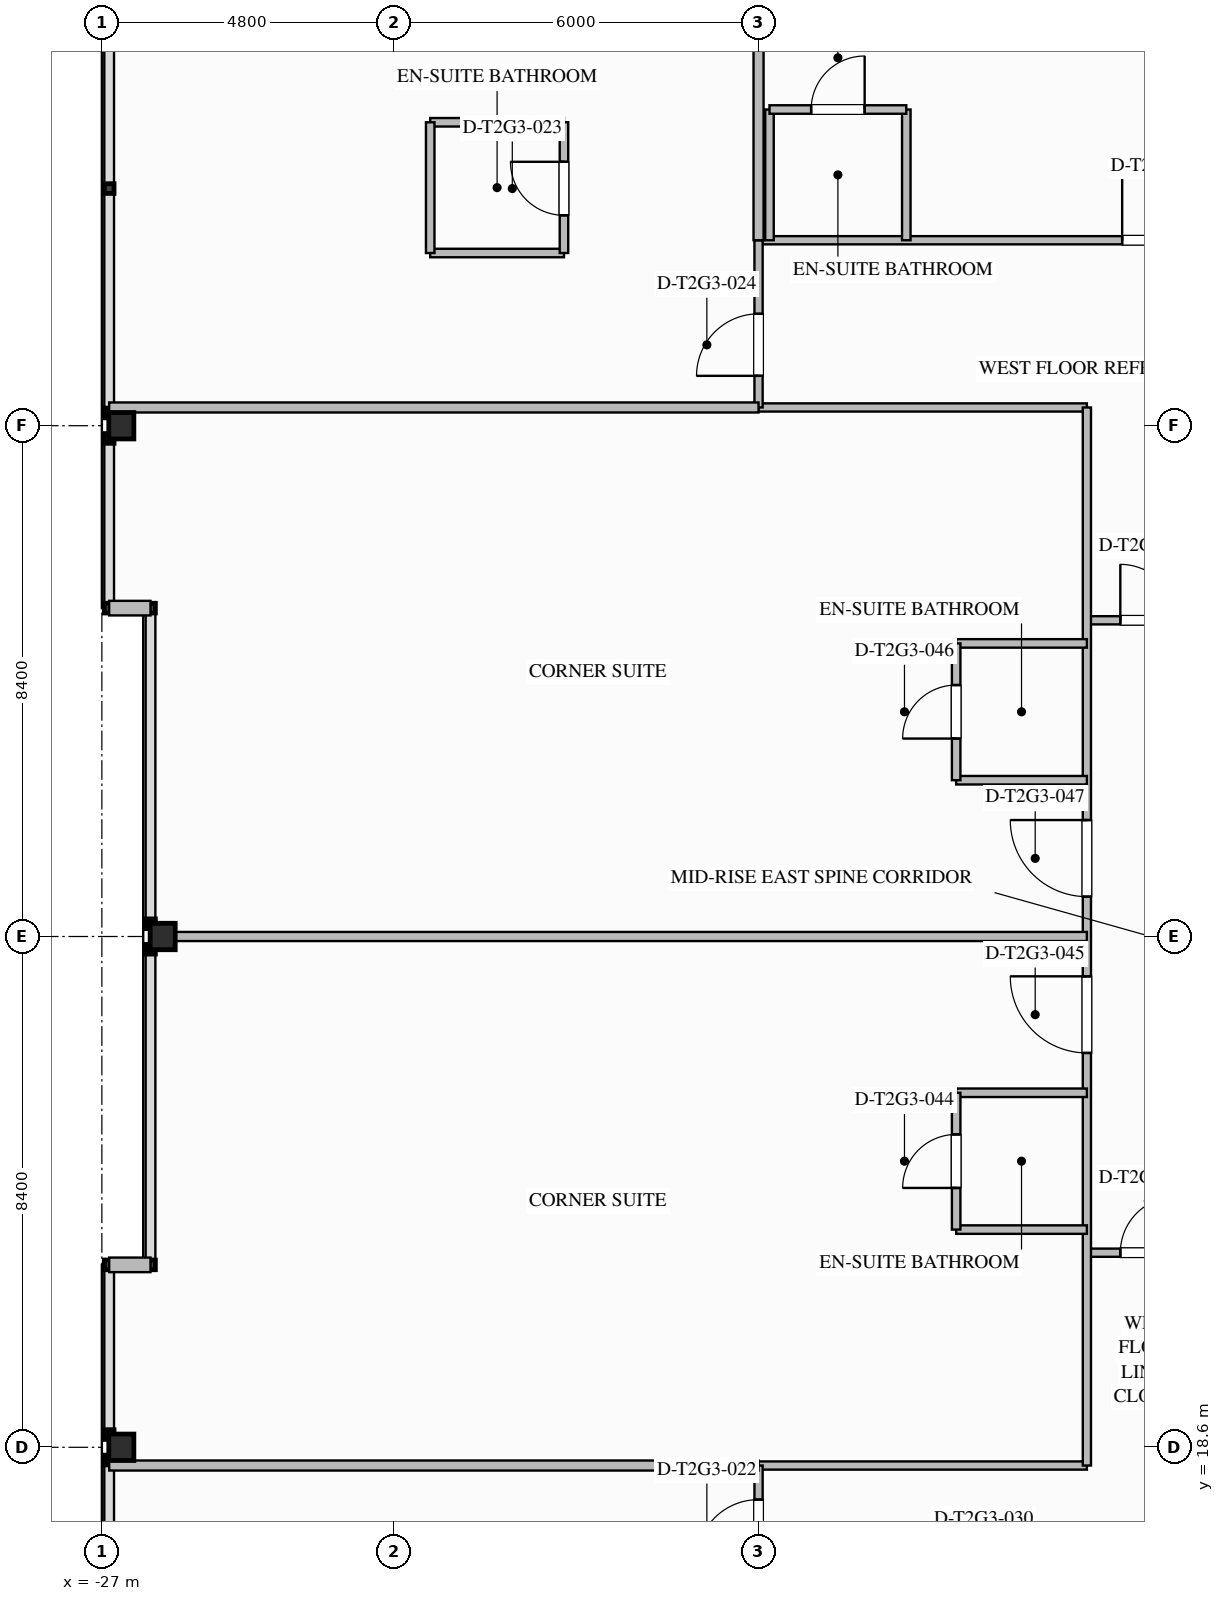
"""IFC4 building model, lengths in metres.
Left out: names, types, materials, properties, quantities, classifications, styles, units other than length and angle.
Written with IfcOpenShell. Run it as: python <this file> out.ifc"""

import sys

from ifc_helpers import new_model, si_unit, direction, frame, frame_2d, origin, origin_2d, place, context, subcontext, project, spatial, rectangle, i_section, extrude, element, fill, save


model = new_model("IFC4")
c1 = context("Model", 3, precision=1e-05, world=origin(), true_north=direction((0.0, 1.0)))
c2 = subcontext(c1, "Body", "Model", "MODEL_VIEW")
j1 = project(units=[si_unit("LENGTHUNIT", "METRE"), si_unit("PLANEANGLEUNIT", "RADIAN")], contexts=[c1])
p1 = place(None, origin())
s1 = spatial("IfcSite", under=j1, at=p1, CompositionType="ELEMENT")
p2 = place(p1, origin())
s2 = spatial("IfcBuilding", under=s1, at=p2, CompositionType="ELEMENT")
p3 = place(p2, frame((0.0, 0.0, 119.8)))
s3 = spatial("IfcBuildingStorey", under=s2, at=p3, CompositionType="ELEMENT", Elevation=119.8)
for number, where, z_axis, x_axis in (
    (1, (-26.68, 18.6, 0.0), (0.0, 0.0, 1.0), (1.0, 0.0, 0.0)),
    (2, (-26.0, 27.0, 0.0), (0.0, 0.0, 1.0), (1.0, 0.0, 0.0)),
    (3, (-26.68, 35.4, 0.0), (0.0, 0.0, 1.0), (1.0, 0.0, 0.0)),
):
    element("IfcColumn", number, at=place(p3, frame(where, z_axis=z_axis, x_axis=x_axis)), inside=s3, PredefinedType="COLUMN", context=c2, shape_type="SweptSolid", body=[
        extrude(i_section(OverallWidth=0.412, OverallDepth=0.435, WebThickness=0.036, FlangeThickness=0.057, FilletRadius=0.028, at=origin_2d()), origin(), (0.0, 0.0, 1.0), 3.497),
    ])
for number, where, z_axis, x_axis in (
    (4, (-26.88, 21.6, 0.0), (0.0, 0.0, 1.0), (1.0, 0.0, 0.0)),
    (5, (-26.2, 32.4, 0.0), (0.0, 0.0, 1.0), (-1.0, 0.0, 0.0)),
):
    element("IfcWall", number, at=place(p3, frame(where, z_axis=z_axis, x_axis=x_axis)), inside=s3, PredefinedType="STANDARD", context=c2, shape_type="SweptSolid", body=[
        extrude(rectangle(XDim=0.68, YDim=0.24, at=frame_2d((0.34, 0.0))), origin(), (0.0, 0.0, 1.0), 3.24),
    ])
p4 = place(p3, frame((-10.8, 21.8, 0.0), z_axis=(0.0, 0.0, 1.0), x_axis=(1.0, 0.0, 0.0)))
e6 = element("IfcWall", 6, at=p4, inside=s3, PredefinedType="PARTITIONING", context=c2, shape_type="SweptSolid", body=[
    extrude(rectangle(XDim=2.1, YDim=0.135, at=frame_2d((1.05, 0.0))), origin(), (0.0, 0.0, 1.0), 3.24),
])
p5 = place(p4, frame((0.55, 0.0, 0.0)))
e7 = element("IfcOpeningElement", 7, at=p5, cuts=e6, PredefinedType="OPENING", context=c2, shape_type="SweptSolid", body=[
    extrude(rectangle(XDim=0.92, YDim=2.1, at=frame_2d((0.46, 1.05))), frame((0.0, 0.077, 0.0), z_axis=(0.0, -1.0, 0.0), x_axis=(1.0, 0.0, 0.0)), (0.0, 0.0, 1.0), 0.155),
])
p6 = place(p3, frame((-10.8, 32.2, 0.0), z_axis=(0.0, 0.0, 1.0), x_axis=(1.0, 0.0, 0.0)))
e8 = element("IfcWall", 8, at=p6, inside=s3, PredefinedType="PARTITIONING", context=c2, shape_type="SweptSolid", body=[
    extrude(rectangle(XDim=2.1, YDim=0.135, at=frame_2d((1.05, 0.0))), origin(), (0.0, 0.0, 1.0), 3.24),
])
p7 = place(p6, frame((0.55, 0.0, 0.0)))
e9 = element("IfcOpeningElement", 9, at=p7, cuts=e8, PredefinedType="OPENING", context=c2, shape_type="SweptSolid", body=[
    extrude(rectangle(XDim=0.92, YDim=2.1, at=frame_2d((0.46, 1.05))), frame((0.0, 0.077, 0.0), z_axis=(0.0, -1.0, 0.0), x_axis=(1.0, 0.0, 0.0)), (0.0, 0.0, 1.0), 0.155),
])
for number, where, z_axis, x_axis in (
    (10, (-16.2, 18.3, 0.0), (0.0, 0.0, 1.0), (1.0, 0.0, 0.0)),
    (11, (-16.2, 35.7, 0.0), (0.0, 0.0, 1.0), (1.0, 0.0, 0.0)),
):
    element("IfcWall", number, at=place(p3, frame(where, z_axis=z_axis, x_axis=x_axis)), inside=s3, PredefinedType="PARTITIONING", context=c2, shape_type="SweptSolid", body=[
        extrude(rectangle(XDim=5.4, YDim=0.135, at=frame_2d((2.7, 0.0))), origin(), (0.0, 0.0, 1.0), 3.24),
    ])
p8 = place(p3, frame((-16.2, 38.45, 0.0), z_axis=(0.0, 0.0, 1.0), x_axis=(1.0, 0.0, 0.0)))
e12 = element("IfcWall", 12, at=p8, inside=s3, PredefinedType="PARTITIONING", context=c2, shape_type="SweptSolid", body=[
    extrude(rectangle(XDim=24.9, YDim=0.135, at=frame_2d((12.45, 0.0))), origin(), (0.0, 0.0, 1.0), 3.24),
])
p9 = place(p8, frame((5.98, 0.0, 0.0)))
e13 = element("IfcOpeningElement", 13, at=p9, cuts=e12, PredefinedType="OPENING", context=c2, shape_type="SweptSolid", body=[
    extrude(rectangle(XDim=1.26, YDim=2.2, at=frame_2d((0.63, 1.1))), frame((0.0, 0.077, 0.0), z_axis=(0.0, -1.0, 0.0), x_axis=(1.0, 0.0, 0.0)), (0.0, 0.0, 1.0), 0.155),
])
p10 = place(p8, frame((16.0, 0.0, 0.0)))
e14 = element("IfcOpeningElement", 14, at=p10, cuts=e12, PredefinedType="OPENING", context=c2, shape_type="SweptSolid", body=[
    extrude(rectangle(XDim=1.26, YDim=2.2, at=frame_2d((0.63, 1.1))), frame((0.0, 0.077, 0.0), z_axis=(0.0, -1.0, 0.0), x_axis=(1.0, 0.0, 0.0)), (0.0, 0.0, 1.0), 0.155),
])
p11 = place(p3, frame((-10.8, 18.3, 0.0), z_axis=(0.0, 0.0, 1.0), x_axis=(0.0, 1.0, 0.0)))
e15 = element("IfcWall", 15, at=p11, inside=s3, PredefinedType="PARTITIONING", context=c2, shape_type="SweptSolid", body=[
    extrude(rectangle(XDim=17.4, YDim=0.135, at=frame_2d((8.7, 0.0))), origin(), (0.0, 0.0, 1.0), 3.24),
])
p12 = place(p11, frame((6.785, 0.0, 0.0)))
e16 = element("IfcOpeningElement", 16, at=p12, cuts=e15, PredefinedType="OPENING", context=c2, shape_type="SweptSolid", body=[
    extrude(rectangle(XDim=1.26, YDim=2.2, at=frame_2d((0.63, 1.1))), frame((0.0, 0.077, 0.0), z_axis=(0.0, -1.0, 0.0), x_axis=(1.0, 0.0, 0.0)), (0.0, 0.0, 1.0), 0.155),
])
p13 = place(p11, frame((9.355, 0.0, 0.0)))
e17 = element("IfcOpeningElement", 17, at=p13, cuts=e15, PredefinedType="OPENING", context=c2, shape_type="SweptSolid", body=[
    extrude(rectangle(XDim=1.26, YDim=2.2, at=frame_2d((0.63, 1.1))), frame((0.0, 0.077, 0.0), z_axis=(0.0, -1.0, 0.0), x_axis=(1.0, 0.0, 0.0)), (0.0, 0.0, 1.0), 0.155),
])
p14 = place(p3, frame((-16.2, 16.2, 0.0), z_axis=(0.0, 0.0, 1.0), x_axis=(0.0, 1.0, 0.0)))
e18 = element("IfcWall", 18, at=p14, inside=s3, PredefinedType="PARTITIONING", context=c2, shape_type="SweptSolid", body=[
    extrude(rectangle(XDim=2.1, YDim=0.135, at=frame_2d((1.05, 0.0))), origin(), (0.0, 0.0, 1.0), 2.53),
])
p15 = place(p14, frame((0.52, 0.0, 0.0)))
e19 = element("IfcOpeningElement", 19, at=p15, cuts=e18, PredefinedType="OPENING", context=c2, shape_type="SweptSolid", body=[
    extrude(rectangle(XDim=1.02, YDim=2.15, at=frame_2d((0.51, 1.075))), frame((0.0, 0.077, 0.0), z_axis=(0.0, -1.0, 0.0), x_axis=(1.0, 0.0, 0.0)), (0.0, 0.0, 1.0), 0.155),
])
p16 = place(p3, frame((-16.2, 35.7, 0.0), z_axis=(0.0, 0.0, 1.0), x_axis=(0.0, 1.0, 0.0)))
e20 = element("IfcWall", 20, at=p16, inside=s3, PredefinedType="PARTITIONING", context=c2, shape_type="SweptSolid", body=[
    extrude(rectangle(XDim=2.75, YDim=0.135, at=frame_2d((1.375, 0.0))), origin(), (0.0, 0.0, 1.0), 2.53),
])
p17 = place(p16, frame((0.52, 0.0, 0.0)))
e21 = element("IfcOpeningElement", 21, at=p17, cuts=e20, PredefinedType="OPENING", context=c2, shape_type="SweptSolid", body=[
    extrude(rectangle(XDim=1.02, YDim=2.15, at=frame_2d((0.51, 1.075))), frame((0.0, 0.077, 0.0), z_axis=(0.0, -1.0, 0.0), x_axis=(1.0, 0.0, 0.0)), (0.0, 0.0, 1.0), 0.155),
])
p18 = place(p3, frame((-16.2, 38.45, 0.0), z_axis=(0.0, 0.0, 1.0), x_axis=(0.0, 1.0, 0.0)))
e22 = element("IfcWall", 22, at=p18, inside=s3, PredefinedType="PARTITIONING", context=c2, shape_type="SweptSolid", body=[
    extrude(rectangle(XDim=15.43, YDim=0.165, at=frame_2d((7.715, 0.0))), origin(), (0.0, 0.0, 1.0), 2.53),
])
for number, where, z_axis, x_axis in (
    (23, (-26.88, 18.3, 0.0), (0.0, 0.0, 1.0), (1.0, 0.0, 0.0)),
    (24, (-26.88, 35.7, 0.0), (0.0, 0.0, 1.0), (1.0, 0.0, 0.0)),
):
    element("IfcWall", number, at=place(p3, frame(where, z_axis=z_axis, x_axis=x_axis)), inside=s3, PredefinedType="PARTITIONING", context=c2, shape_type="SweptSolid", body=[
        extrude(rectangle(XDim=10.68, YDim=0.165, at=frame_2d((5.34, 0.0))), origin(), (0.0, 0.0, 1.0), 2.53),
    ])
for number, where, z_axis, x_axis in (
    (25, (-21.6, 38.24, 0.0), (0.0, 0.0, 1.0), (1.0, 0.0, 0.0)),
    (26, (-21.6, 40.39, 0.0), (0.0, 0.0, 1.0), (1.0, 0.0, 0.0)),
):
    element("IfcWall", number, at=place(p3, frame(where, z_axis=z_axis, x_axis=x_axis)), inside=s3, PredefinedType="PLUMBINGWALL", context=c2, shape_type="SweptSolid", body=[
        extrude(rectangle(XDim=2.2, YDim=0.14, at=frame_2d((1.1, 0.0))), origin(), (0.0, 0.0, 1.0), 3.24),
    ])
p19 = place(p3, frame((-21.6, 38.24, 0.0), z_axis=(0.0, 0.0, 1.0), x_axis=(0.0, 1.0, 0.0)))
e27 = element("IfcWall", 27, at=p19, inside=s3, PredefinedType="PLUMBINGWALL", context=c2, shape_type="SweptSolid", body=[
    extrude(rectangle(XDim=2.15, YDim=0.14, at=frame_2d((1.075, 0.0))), origin(), (0.0, 0.0, 1.0), 3.24),
])
p20 = place(p3, frame((-19.4, 38.24, 0.0), z_axis=(0.0, 0.0, 1.0), x_axis=(0.0, 1.0, 0.0)))
e28 = element("IfcWall", 28, at=p20, inside=s3, PredefinedType="PLUMBINGWALL", context=c2, shape_type="SweptSolid", body=[
    extrude(rectangle(XDim=2.15, YDim=0.14, at=frame_2d((1.075, 0.0))), origin(), (0.0, 0.0, 1.0), 3.24),
])
p21 = place(p20, frame((0.62, 0.0, 0.0)))
e29 = element("IfcOpeningElement", 29, at=p21, cuts=e28, PredefinedType="OPENING", context=c2, shape_type="SweptSolid", body=[
    extrude(rectangle(XDim=0.88, YDim=2.1, at=frame_2d((0.44, 1.05))), frame((0.0, 0.08, 0.0), z_axis=(0.0, -1.0, 0.0), x_axis=(1.0, 0.0, 0.0)), (0.0, 0.0, 1.0), 0.16),
])
p22 = place(p3, frame((-16.02, 38.45, 0.0), z_axis=(0.0, 0.0, 1.0), x_axis=(0.0, 1.0, 0.0)))
e30 = element("IfcWall", 30, at=p22, inside=s3, PredefinedType="PLUMBINGWALL", context=c2, shape_type="SweptSolid", body=[
    extrude(rectangle(XDim=2.15, YDim=0.14, at=frame_2d((1.075, 0.0))), origin(), (0.0, 0.0, 1.0), 2.53),
])
p23 = place(p3, frame((-13.77, 38.45, 0.0), z_axis=(0.0, 0.0, 1.0), x_axis=(0.0, 1.0, 0.0)))
e31 = element("IfcWall", 31, at=p23, inside=s3, PredefinedType="PLUMBINGWALL", context=c2, shape_type="SweptSolid", body=[
    extrude(rectangle(XDim=2.15, YDim=0.14, at=frame_2d((1.075, 0.0))), origin(), (0.0, 0.0, 1.0), 3.24),
])
p24 = place(p3, frame((-16.02, 40.6, 0.0), z_axis=(0.0, 0.0, 1.0), x_axis=(1.0, 0.0, 0.0)))
e32 = element("IfcWall", 32, at=p24, inside=s3, PredefinedType="PLUMBINGWALL", context=c2, shape_type="SweptSolid", body=[
    extrude(rectangle(XDim=2.25, YDim=0.14, at=frame_2d((1.125, 0.0))), origin(), (0.0, 0.0, 1.0), 3.24),
])
p25 = place(p24, frame((0.685, 0.0, 0.0)))
e33 = element("IfcOpeningElement", 33, at=p25, cuts=e32, PredefinedType="OPENING", context=c2, shape_type="SweptSolid", body=[
    extrude(rectangle(XDim=0.88, YDim=2.1, at=frame_2d((0.44, 1.05))), frame((0.0, 0.08, 0.0), z_axis=(0.0, -1.0, 0.0), x_axis=(1.0, 0.0, 0.0)), (0.0, 0.0, 1.0), 0.16),
])
p26 = place(p3, frame((-26.2, 27.0, 0.0), z_axis=(0.0, 0.0, 1.0), x_axis=(1.0, 0.0, 0.0)))
e34 = element("IfcWall", 34, at=p26, inside=s3, PredefinedType="PARTITIONING", context=c2, shape_type="SweptSolid", body=[
    extrude(rectangle(XDim=15.4, YDim=0.15, at=frame_2d((7.7, 0.0))), origin(), (0.0, 0.0, 1.0), 2.53),
])
for number, where, z_axis, x_axis in (
    (35, (-10.8, 22.18, 0.0), (0.0, 0.0, 1.0), (-1.0, 0.0, 0.0)),
    (36, (-10.8, 24.43, 0.0), (0.0, 0.0, 1.0), (-1.0, 0.0, 0.0)),
):
    element("IfcWall", number, at=place(p3, frame(where, z_axis=z_axis, x_axis=x_axis)), inside=s3, PredefinedType="PLUMBINGWALL", context=c2, shape_type="SweptSolid", body=[
        extrude(rectangle(XDim=2.15, YDim=0.14, at=frame_2d((1.075, 0.0))), origin(), (0.0, 0.0, 1.0), 3.24),
    ])
p27 = place(p3, frame((-12.95, 22.18, 0.0), z_axis=(0.0, 0.0, 1.0), x_axis=(0.0, 1.0, 0.0)))
e37 = element("IfcWall", 37, at=p27, inside=s3, PredefinedType="PLUMBINGWALL", context=c2, shape_type="SweptSolid", body=[
    extrude(rectangle(XDim=2.25, YDim=0.14, at=frame_2d((1.125, 0.0))), origin(), (0.0, 0.0, 1.0), 3.24),
])
p28 = place(p27, frame((0.685, 0.0, 0.0)))
e38 = element("IfcOpeningElement", 38, at=p28, cuts=e37, PredefinedType="OPENING", context=c2, shape_type="SweptSolid", body=[
    extrude(rectangle(XDim=0.88, YDim=2.1, at=frame_2d((0.44, 1.05))), frame((0.0, 0.08, 0.0), z_axis=(0.0, -1.0, 0.0), x_axis=(1.0, 0.0, 0.0)), (0.0, 0.0, 1.0), 0.16),
])
for number, where, z_axis, x_axis in (
    (39, (-10.8, 29.57, 0.0), (0.0, 0.0, 1.0), (-1.0, 0.0, 0.0)),
    (40, (-10.8, 31.82, 0.0), (0.0, 0.0, 1.0), (-1.0, 0.0, 0.0)),
):
    element("IfcWall", number, at=place(p3, frame(where, z_axis=z_axis, x_axis=x_axis)), inside=s3, PredefinedType="PLUMBINGWALL", context=c2, shape_type="SweptSolid", body=[
        extrude(rectangle(XDim=2.15, YDim=0.14, at=frame_2d((1.075, 0.0))), origin(), (0.0, 0.0, 1.0), 3.24),
    ])
p29 = place(p3, frame((-12.95, 29.57, 0.0), z_axis=(0.0, 0.0, 1.0), x_axis=(0.0, 1.0, 0.0)))
e41 = element("IfcWall", 41, at=p29, inside=s3, PredefinedType="PLUMBINGWALL", context=c2, shape_type="SweptSolid", body=[
    extrude(rectangle(XDim=2.25, YDim=0.14, at=frame_2d((1.125, 0.0))), origin(), (0.0, 0.0, 1.0), 3.24),
])
p30 = place(p29, frame((0.685, 0.0, 0.0)))
e42 = element("IfcOpeningElement", 42, at=p30, cuts=e41, PredefinedType="OPENING", context=c2, shape_type="SweptSolid", body=[
    extrude(rectangle(XDim=0.88, YDim=2.1, at=frame_2d((0.44, 1.05))), frame((0.0, 0.08, 0.0), z_axis=(0.0, -1.0, 0.0), x_axis=(1.0, 0.0, 0.0)), (0.0, 0.0, 1.0), 0.16),
])
p31 = place(p5, origin())
e43 = element("IfcDoor", 43, at=p31, inside=s3, OperationType="SINGLE_SWING_RIGHT", PredefinedType="DOOR", context=c2, shape_type="SweptSolid", body=[
    extrude(rectangle(XDim=0.92, YDim=2.1, at=frame_2d((0.46, 1.05))), frame((0.0, 0.025, 0.0), z_axis=(0.0, -1.0, 0.0), x_axis=(1.0, 0.0, 0.0)), (0.0, 0.0, 1.0), 0.05),
])
fill(e7, e43)
p32 = place(p7, origin())
e44 = element("IfcDoor", 44, at=p32, inside=s3, OperationType="SINGLE_SWING_LEFT", PredefinedType="DOOR", context=c2, shape_type="SweptSolid", body=[
    extrude(rectangle(XDim=0.92, YDim=2.1, at=frame_2d((0.46, 1.05))), frame((0.0, 0.025, 0.0), z_axis=(0.0, -1.0, 0.0), x_axis=(1.0, 0.0, 0.0)), (0.0, 0.0, 1.0), 0.05),
])
fill(e9, e44)
p33 = place(p15, origin())
e45 = element("IfcDoor", 45, at=p33, inside=s3, OperationType="SINGLE_SWING_LEFT", PredefinedType="DOOR", context=c2, shape_type="SweptSolid", body=[
    extrude(rectangle(XDim=1.02, YDim=2.15, at=frame_2d((0.51, 1.075))), frame((0.0, 0.025, 0.0), z_axis=(0.0, -1.0, 0.0), x_axis=(1.0, 0.0, 0.0)), (0.0, 0.0, 1.0), 0.05),
])
fill(e19, e45)
p34 = place(p21, origin())
e46 = element("IfcDoor", 46, at=p34, inside=s3, OperationType="SINGLE_SWING_RIGHT", PredefinedType="DOOR", context=c2, shape_type="SweptSolid", body=[
    extrude(rectangle(XDim=0.88, YDim=2.1, at=frame_2d((0.44, 1.05))), frame((0.0, 0.025, 0.0), z_axis=(0.0, -1.0, 0.0), x_axis=(1.0, 0.0, 0.0)), (0.0, 0.0, 1.0), 0.05),
])
fill(e29, e46)
p35 = place(p17, origin())
e47 = element("IfcDoor", 47, at=p35, inside=s3, OperationType="SINGLE_SWING_LEFT", PredefinedType="DOOR", context=c2, shape_type="SweptSolid", body=[
    extrude(rectangle(XDim=1.02, YDim=2.15, at=frame_2d((0.51, 1.075))), frame((0.0, 0.025, 0.0), z_axis=(0.0, -1.0, 0.0), x_axis=(1.0, 0.0, 0.0)), (0.0, 0.0, 1.0), 0.05),
])
fill(e21, e47)
p36 = place(p25, origin())
e48 = element("IfcDoor", 48, at=p36, inside=s3, OperationType="SINGLE_SWING_RIGHT", PredefinedType="DOOR", context=c2, shape_type="SweptSolid", body=[
    extrude(rectangle(XDim=0.88, YDim=2.1, at=frame_2d((0.44, 1.05))), frame((0.0, 0.025, 0.0), z_axis=(0.0, -1.0, 0.0), x_axis=(1.0, 0.0, 0.0)), (0.0, 0.0, 1.0), 0.05),
])
fill(e33, e48)
p37 = place(p9, origin())
e49 = element("IfcDoor", 49, at=p37, inside=s3, OperationType="SINGLE_SWING_LEFT", PredefinedType="DOOR", context=c2, shape_type="SweptSolid", body=[
    extrude(rectangle(XDim=1.26, YDim=2.2, at=frame_2d((0.63, 1.1))), frame((0.0, 0.025, 0.0), z_axis=(0.0, -1.0, 0.0), x_axis=(1.0, 0.0, 0.0)), (0.0, 0.0, 1.0), 0.05),
])
fill(e13, e49)
p38 = place(p28, origin())
e50 = element("IfcDoor", 50, at=p38, inside=s3, OperationType="SINGLE_SWING_LEFT", PredefinedType="DOOR", context=c2, shape_type="SweptSolid", body=[
    extrude(rectangle(XDim=0.88, YDim=2.1, at=frame_2d((0.44, 1.05))), frame((0.0, 0.025, 0.0), z_axis=(0.0, -1.0, 0.0), x_axis=(1.0, 0.0, 0.0)), (0.0, 0.0, 1.0), 0.05),
])
fill(e38, e50)
p39 = place(p12, origin())
e51 = element("IfcDoor", 51, at=p39, inside=s3, OperationType="SINGLE_SWING_RIGHT", PredefinedType="DOOR", context=c2, shape_type="SweptSolid", body=[
    extrude(rectangle(XDim=1.26, YDim=2.2, at=frame_2d((0.63, 1.1))), frame((0.0, 0.025, 0.0), z_axis=(0.0, -1.0, 0.0), x_axis=(1.0, 0.0, 0.0)), (0.0, 0.0, 1.0), 0.05),
])
fill(e16, e51)
p40 = place(p30, origin())
e52 = element("IfcDoor", 52, at=p40, inside=s3, OperationType="SINGLE_SWING_LEFT", PredefinedType="DOOR", context=c2, shape_type="SweptSolid", body=[
    extrude(rectangle(XDim=0.88, YDim=2.1, at=frame_2d((0.44, 1.05))), frame((0.0, 0.025, 0.0), z_axis=(0.0, -1.0, 0.0), x_axis=(1.0, 0.0, 0.0)), (0.0, 0.0, 1.0), 0.05),
])
fill(e42, e52)
p41 = place(p13, origin())
e53 = element("IfcDoor", 53, at=p41, inside=s3, OperationType="SINGLE_SWING_RIGHT", PredefinedType="DOOR", context=c2, shape_type="SweptSolid", body=[
    extrude(rectangle(XDim=1.26, YDim=2.2, at=frame_2d((0.63, 1.1))), frame((0.0, 0.025, 0.0), z_axis=(0.0, -1.0, 0.0), x_axis=(1.0, 0.0, 0.0)), (0.0, 0.0, 1.0), 0.05),
])
fill(e17, e53)
save(model, sys.argv[1])
